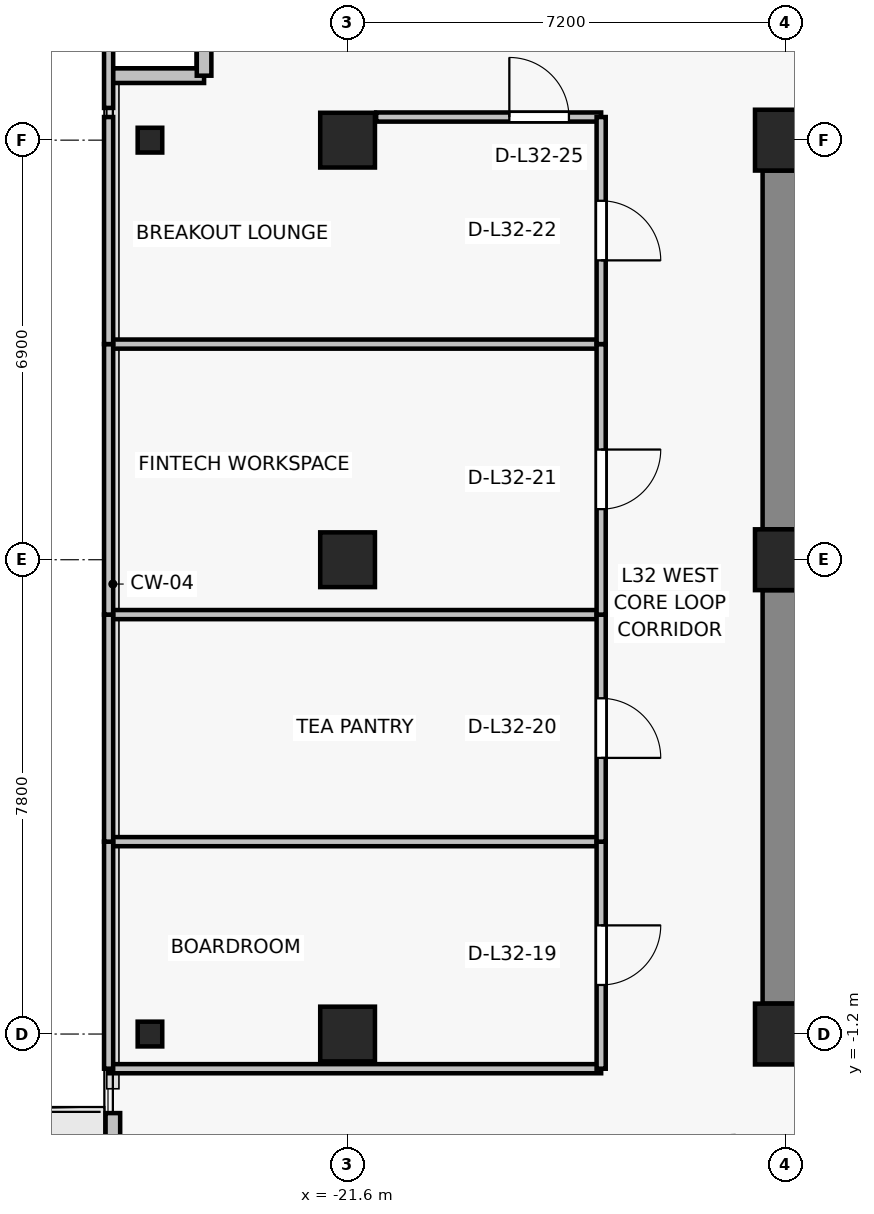
"""IFC4 building model, lengths in metres.
Left out: names, types, materials, properties, quantities, classifications, styles, units other than length and angle.
Written with IfcOpenShell. Run it as: python <this file> out.ifc"""

import sys

from ifc_helpers import new_model, si_unit, direction, frame, frame_2d, origin, origin_2d, place, context, subcontext, project, spatial, rectangle, i_section, extrude, source, transform, mapped, element, fill, save


model = new_model("IFC4")
c1 = context("Model", 3, precision=1e-05, world=origin(), true_north=direction((0.0, 1.0)))
c2 = subcontext(c1, "Body", "Model", "MODEL_VIEW")
j1 = project(units=[si_unit("LENGTHUNIT", "METRE"), si_unit("PLANEANGLEUNIT", "RADIAN")], contexts=[c1])
p1 = place(None, origin())
s1 = spatial("IfcSite", under=j1, at=p1, CompositionType="ELEMENT")
p2 = place(p1, origin())
s2 = spatial("IfcBuilding", under=s1, at=p2, CompositionType="ELEMENT")
p3 = place(p2, frame((0.0, 0.0, 116.5)))
s3 = spatial("IfcBuildingStorey", under=s2, at=p3, CompositionType="ELEMENT", Elevation=116.5)
for number, where, z_axis, x_axis in (
    (1, (-14.4, -1.2, 0.0), (0.0, 0.0, 1.0), (1.0, 0.0, 0.0)),
    (2, (-14.4, 6.6, 0.0), (0.0, 0.0, 1.0), (1.0, 0.0, 0.0)),
    (3, (-14.4, 13.5, 0.0), (0.0, 0.0, 1.0), (1.0, 0.0, 0.0)),
):
    element("IfcColumn", number, at=place(p3, frame(where, z_axis=z_axis, x_axis=x_axis)), inside=s3, PredefinedType="COLUMN", context=c2, shape_type="SweptSolid", body=[
        extrude(rectangle(XDim=1.0, YDim=1.0, at=origin_2d()), origin(), (0.0, 0.0, 1.0), 3.3),
    ])
for number, where, z_axis, x_axis in (
    (4, (-21.6, -1.2, 0.0), (0.0, 0.0, 1.0), (1.0, 0.0, 0.0)),
    (5, (-21.6, 6.6, 0.0), (0.0, 0.0, 1.0), (1.0, 0.0, 0.0)),
    (6, (-21.6, 13.5, 0.0), (0.0, 0.0, 1.0), (1.0, 0.0, 0.0)),
):
    element("IfcColumn", number, at=place(p3, frame(where, z_axis=z_axis, x_axis=x_axis)), inside=s3, PredefinedType="COLUMN", context=c2, shape_type="SweptSolid", body=[
        extrude(rectangle(XDim=0.9, YDim=0.9, at=origin_2d()), origin(), (0.0, 0.0, 1.0), 3.3),
    ])
for number, where, z_axis, x_axis in (
    (7, (-24.85, -1.2, 0.0), (0.0, 0.0, 1.0), (1.0, 0.0, 0.0)),
    (8, (-24.85, 13.5, 0.0), (0.0, 0.0, 1.0), (1.0, 0.0, 0.0)),
):
    element("IfcColumn", number, at=place(p3, frame(where, z_axis=z_axis, x_axis=x_axis)), inside=s3, PredefinedType="COLUMN", context=c2, shape_type="SweptSolid", body=[
        extrude(i_section(OverallWidth=0.404, OverallDepth=0.407, WebThickness=0.022, FlangeThickness=0.032, FilletRadius=0.015, at=origin_2d()), origin(), (0.0, 0.0, 1.0), 3.3),
    ])
p4 = place(p3, frame((-14.4, -0.7, 0.0), z_axis=(0.0, 0.0, 1.0), x_axis=(0.0, 1.0, 0.0)))
e9 = element("IfcWall", 9, at=p4, inside=s3, PredefinedType="SHEAR", context=c2, shape_type="SweptSolid", body=[
    extrude(rectangle(XDim=6.8, YDim=0.75, at=frame_2d((3.4, 0.0))), origin(), (0.0, 0.0, 1.0), 3.075),
])
p5 = place(p3, frame((-14.4, 7.1, 0.0), z_axis=(0.0, 0.0, 1.0), x_axis=(0.0, 1.0, 0.0)))
e10 = element("IfcWall", 10, at=p5, inside=s3, PredefinedType="SHEAR", context=c2, shape_type="SweptSolid", body=[
    extrude(rectangle(XDim=5.9, YDim=0.75, at=frame_2d((2.95, 0.0))), origin(), (0.0, 0.0, 1.0), 3.075),
])
p6 = place(p3, frame((-25.46, -8.3, 0.0), z_axis=(0.0, 0.0, 1.0), x_axis=(0.0, 1.0, 0.0)))
e11 = element("IfcWall", 11, at=p6, inside=s3, PredefinedType="SOLIDWALL", context=c2, shape_type="SweptSolid", body=[
    extrude(rectangle(XDim=5.8, YDim=0.24, at=frame_2d((2.9, 0.0))), origin(), (0.0, 0.0, 1.0), 3.075),
])
p7 = place(p6, frame((0.696, 0.0, 0.0)))
e12 = element("IfcOpeningElement", 12, at=p7, cuts=e11, PredefinedType="OPENING", context=c2, shape_type="SweptSolid", body=[
    extrude(rectangle(XDim=1.0, YDim=2.2, at=frame_2d((0.5, 1.1))), frame((0.0, 0.13, 0.0), z_axis=(0.0, -1.0, 0.0), x_axis=(1.0, 0.0, 0.0)), (0.0, 0.0, 1.0), 0.26),
])
p8 = place(p6, frame((2.046, 0.0, 0.85)))
e13 = element("IfcOpeningElement", 13, at=p8, cuts=e11, PredefinedType="OPENING", context=c2, shape_type="SweptSolid", body=[
    extrude(rectangle(XDim=0.9, YDim=1.35, at=frame_2d((0.45, 0.675))), frame((0.0, 0.13, 0.0), z_axis=(0.0, -1.0, 0.0), x_axis=(1.0, 0.0, 0.0)), (0.0, 0.0, 1.0), 0.26),
])
for number, where, z_axis, x_axis in (
    (14, (-23.96, 14.56, 0.0), (0.0, 0.0, 1.0), (-1.0, 0.0, 0.0)),
    (15, (-23.96, 16.06, 0.0), (0.0, 0.0, 1.0), (0.0, -1.0, 0.0)),
):
    element("IfcWall", number, at=place(p3, frame(where, z_axis=z_axis, x_axis=x_axis)), inside=s3, PredefinedType="SOLIDWALL", context=c2, shape_type="SweptSolid", body=[
        extrude(rectangle(XDim=1.5, YDim=0.24, at=frame_2d((0.75, 0.0))), origin(), (0.0, 0.0, 1.0), 3.075),
    ])
for number, where, z_axis, x_axis in (
    (16, (-17.43, -1.77, 0.0), (0.0, 0.0, 1.0), (-1.0, 0.0, 0.0)),
    (17, (-25.53, 1.964, 0.0), (0.0, 0.0, 1.0), (1.0, 0.0, 0.0)),
):
    element("IfcWall", number, at=place(p3, frame(where, z_axis=z_axis, x_axis=x_axis)), inside=s3, PredefinedType="PARTITIONING", context=c2, shape_type="SweptSolid", body=[
        extrude(rectangle(XDim=8.1, YDim=0.15, at=frame_2d((4.05, 0.0))), origin(), (0.0, 0.0, 1.0), 2.515),
    ])
p9 = place(p3, frame((-25.53, -1.77, 0.0), z_axis=(0.0, 0.0, 1.0), x_axis=(0.0, 1.0, 0.0)))
e18 = element("IfcWall", 18, at=p9, inside=s3, PredefinedType="PARTITIONING", context=c2, shape_type="SweptSolid", body=[
    extrude(rectangle(XDim=3.734, YDim=0.15, at=frame_2d((1.867, 0.0))), origin(), (0.0, 0.0, 1.0), 3.075),
])
p10 = place(p3, frame((-17.43, 1.964, 0.0), z_axis=(0.0, 0.0, 1.0), x_axis=(0.0, -1.0, 0.0)))
e19 = element("IfcWall", 19, at=p10, inside=s3, PredefinedType="PARTITIONING", context=c2, shape_type="SweptSolid", body=[
    extrude(rectangle(XDim=3.734, YDim=0.15, at=frame_2d((1.867, 0.0))), origin(), (0.0, 0.0, 1.0), 2.515),
])
p11 = place(p10, frame((1.377, 0.0, 0.0)))
e20 = element("IfcOpeningElement", 20, at=p11, cuts=e19, PredefinedType="OPENING", context=c2, shape_type="SweptSolid", body=[
    extrude(rectangle(XDim=0.98, YDim=2.15, at=frame_2d((0.49, 1.075))), frame((0.0, 0.085, 0.0), z_axis=(0.0, -1.0, 0.0), x_axis=(1.0, 0.0, 0.0)), (0.0, 0.0, 1.0), 0.17),
])
p12 = place(p3, frame((-25.53, 5.698, 0.0), z_axis=(0.0, 0.0, 1.0), x_axis=(1.0, 0.0, 0.0)))
e21 = element("IfcWall", 21, at=p12, inside=s3, PredefinedType="PARTITIONING", context=c2, shape_type="SweptSolid", body=[
    extrude(rectangle(XDim=8.1, YDim=0.15, at=frame_2d((4.05, 0.0))), origin(), (0.0, 0.0, 1.0), 2.515),
])
p13 = place(p3, frame((-25.53, 1.964, 0.0), z_axis=(0.0, 0.0, 1.0), x_axis=(0.0, 1.0, 0.0)))
e22 = element("IfcWall", 22, at=p13, inside=s3, PredefinedType="PARTITIONING", context=c2, shape_type="SweptSolid", body=[
    extrude(rectangle(XDim=3.734, YDim=0.15, at=frame_2d((1.867, 0.0))), origin(), (0.0, 0.0, 1.0), 3.075),
])
p14 = place(p3, frame((-17.43, 5.698, 0.0), z_axis=(0.0, 0.0, 1.0), x_axis=(0.0, -1.0, 0.0)))
e23 = element("IfcWall", 23, at=p14, inside=s3, PredefinedType="PARTITIONING", context=c2, shape_type="SweptSolid", body=[
    extrude(rectangle(XDim=3.734, YDim=0.15, at=frame_2d((1.867, 0.0))), origin(), (0.0, 0.0, 1.0), 3.075),
])
p15 = place(p14, frame((1.377, 0.0, 0.0)))
e24 = element("IfcOpeningElement", 24, at=p15, cuts=e23, PredefinedType="OPENING", context=c2, shape_type="SweptSolid", body=[
    extrude(rectangle(XDim=0.98, YDim=2.15, at=frame_2d((0.49, 1.075))), frame((0.0, 0.085, 0.0), z_axis=(0.0, -1.0, 0.0), x_axis=(1.0, 0.0, 0.0)), (0.0, 0.0, 1.0), 0.17),
])
p16 = place(p3, frame((-25.53, 10.146, 0.0), z_axis=(0.0, 0.0, 1.0), x_axis=(1.0, 0.0, 0.0)))
e25 = element("IfcWall", 25, at=p16, inside=s3, PredefinedType="PARTITIONING", context=c2, shape_type="SweptSolid", body=[
    extrude(rectangle(XDim=8.1, YDim=0.15, at=frame_2d((4.05, 0.0))), origin(), (0.0, 0.0, 1.0), 2.515),
])
p17 = place(p3, frame((-25.53, 5.698, 0.0), z_axis=(0.0, 0.0, 1.0), x_axis=(0.0, 1.0, 0.0)))
e26 = element("IfcWall", 26, at=p17, inside=s3, PredefinedType="PARTITIONING", context=c2, shape_type="SweptSolid", body=[
    extrude(rectangle(XDim=4.449, YDim=0.15, at=frame_2d((2.224, 0.0))), origin(), (0.0, 0.0, 1.0), 3.075),
])
p18 = place(p3, frame((-17.43, 10.146, 0.0), z_axis=(0.0, 0.0, 1.0), x_axis=(0.0, -1.0, 0.0)))
e27 = element("IfcWall", 27, at=p18, inside=s3, PredefinedType="PARTITIONING", context=c2, shape_type="SweptSolid", body=[
    extrude(rectangle(XDim=4.449, YDim=0.15, at=frame_2d((2.224, 0.0))), origin(), (0.0, 0.0, 1.0), 2.515),
])
p19 = place(p18, frame((1.734, 0.0, 0.0)))
e28 = element("IfcOpeningElement", 28, at=p19, cuts=e27, PredefinedType="OPENING", context=c2, shape_type="SweptSolid", body=[
    extrude(rectangle(XDim=0.98, YDim=2.15, at=frame_2d((0.49, 1.075))), frame((0.0, 0.085, 0.0), z_axis=(0.0, -1.0, 0.0), x_axis=(1.0, 0.0, 0.0)), (0.0, 0.0, 1.0), 0.17),
])
p20 = place(p3, frame((-21.13, 13.88, 0.0), z_axis=(0.0, 0.0, 1.0), x_axis=(1.0, 0.0, 0.0)))
e29 = element("IfcWall", 29, at=p20, inside=s3, PredefinedType="PARTITIONING", context=c2, shape_type="SweptSolid", body=[
    extrude(rectangle(XDim=3.7, YDim=0.15, at=frame_2d((1.85, 0.0))), origin(), (0.0, 0.0, 1.0), 3.075),
])
p21 = place(p20, frame((2.19, 0.0, 0.0)))
e30 = element("IfcOpeningElement", 30, at=p21, cuts=e29, PredefinedType="OPENING", context=c2, shape_type="SweptSolid", body=[
    extrude(rectangle(XDim=0.98, YDim=2.15, at=frame_2d((0.49, 1.075))), frame((0.0, 0.085, 0.0), z_axis=(0.0, -1.0, 0.0), x_axis=(1.0, 0.0, 0.0)), (0.0, 0.0, 1.0), 0.17),
])
p22 = place(p3, frame((-25.53, 10.146, 0.0), z_axis=(0.0, 0.0, 1.0), x_axis=(0.0, 1.0, 0.0)))
e31 = element("IfcWall", 31, at=p22, inside=s3, PredefinedType="PARTITIONING", context=c2, shape_type="SweptSolid", body=[
    extrude(rectangle(XDim=3.734, YDim=0.15, at=frame_2d((1.867, 0.0))), origin(), (0.0, 0.0, 1.0), 3.075),
])
p23 = place(p3, frame((-17.43, 13.88, 0.0), z_axis=(0.0, 0.0, 1.0), x_axis=(0.0, -1.0, 0.0)))
e32 = element("IfcWall", 32, at=p23, inside=s3, PredefinedType="PARTITIONING", context=c2, shape_type="SweptSolid", body=[
    extrude(rectangle(XDim=3.734, YDim=0.15, at=frame_2d((1.867, 0.0))), origin(), (0.0, 0.0, 1.0), 2.515),
])
p24 = place(p23, frame((1.377, 0.0, 0.0)))
e33 = element("IfcOpeningElement", 33, at=p24, cuts=e32, PredefinedType="OPENING", context=c2, shape_type="SweptSolid", body=[
    extrude(rectangle(XDim=0.98, YDim=2.15, at=frame_2d((0.49, 1.075))), frame((0.0, 0.085, 0.0), z_axis=(0.0, -1.0, 0.0), x_axis=(1.0, 0.0, 0.0)), (0.0, 0.0, 1.0), 0.17),
])
p25 = place(p3, frame((-25.53, 14.03, 0.0), z_axis=(0.0, 0.0, 1.0), x_axis=(0.0, 1.0, 0.0)))
e34 = element("IfcWall", 34, at=p25, inside=s3, PredefinedType="PARTITIONING", context=c2, shape_type="SweptSolid", body=[
    extrude(rectangle(XDim=3.6, YDim=0.15, at=frame_2d((1.8, 0.0))), origin(), (0.0, 0.0, 1.0), 3.075),
])
m1 = source(origin(), c2, "Body", "SweptSolid", [
    extrude(rectangle(XDim=0.98, YDim=2.15, at=frame_2d((0.49, 1.075))), frame((0.0, 0.025, 0.0), z_axis=(0.0, -1.0, 0.0), x_axis=(1.0, 0.0, 0.0)), (0.0, 0.0, 1.0), 0.05),
])
p26 = place(p11, origin())
e35 = element("IfcDoor", 35, at=p26, inside=s3, OperationType="SINGLE_SWING_LEFT", PredefinedType="DOOR", context=c2, shape_type="MappedRepresentation", body=[
    mapped(m1, transform((0.0, 0.0, 0.0), x_axis=(1.0, 0.0, 0.0), y_axis=(0.0, 1.0, 0.0), z_axis=(0.0, 0.0, 1.0), scale=1.0)),
])
fill(e20, e35)
p27 = place(p15, origin())
e36 = element("IfcDoor", 36, at=p27, inside=s3, OperationType="SINGLE_SWING_RIGHT", PredefinedType="DOOR", context=c2, shape_type="MappedRepresentation", body=[
    mapped(m1, transform((0.0, 0.0, 0.0), x_axis=(1.0, 0.0, 0.0), y_axis=(0.0, 1.0, 0.0), z_axis=(0.0, 0.0, 1.0), scale=1.0)),
])
fill(e24, e36)
p28 = place(p19, origin())
e37 = element("IfcDoor", 37, at=p28, inside=s3, OperationType="SINGLE_SWING_LEFT", PredefinedType="DOOR", context=c2, shape_type="MappedRepresentation", body=[
    mapped(m1, transform((0.0, 0.0, 0.0), x_axis=(1.0, 0.0, 0.0), y_axis=(0.0, 1.0, 0.0), z_axis=(0.0, 0.0, 1.0), scale=1.0)),
])
fill(e28, e37)
p29 = place(p24, origin())
e38 = element("IfcDoor", 38, at=p29, inside=s3, OperationType="SINGLE_SWING_RIGHT", PredefinedType="DOOR", context=c2, shape_type="MappedRepresentation", body=[
    mapped(m1, transform((0.0, 0.0, 0.0), x_axis=(1.0, 0.0, 0.0), y_axis=(0.0, 1.0, 0.0), z_axis=(0.0, 0.0, 1.0), scale=1.0)),
])
fill(e33, e38)
p30 = place(p21, origin())
e39 = element("IfcDoor", 39, at=p30, inside=s3, OperationType="SINGLE_SWING_LEFT", PredefinedType="DOOR", context=c2, shape_type="MappedRepresentation", body=[
    mapped(m1, transform((0.0, 0.0, 0.0), x_axis=(1.0, 0.0, 0.0), y_axis=(0.0, 1.0, 0.0), z_axis=(0.0, 0.0, 1.0), scale=1.0)),
])
fill(e30, e39)
save(model, sys.argv[1])
